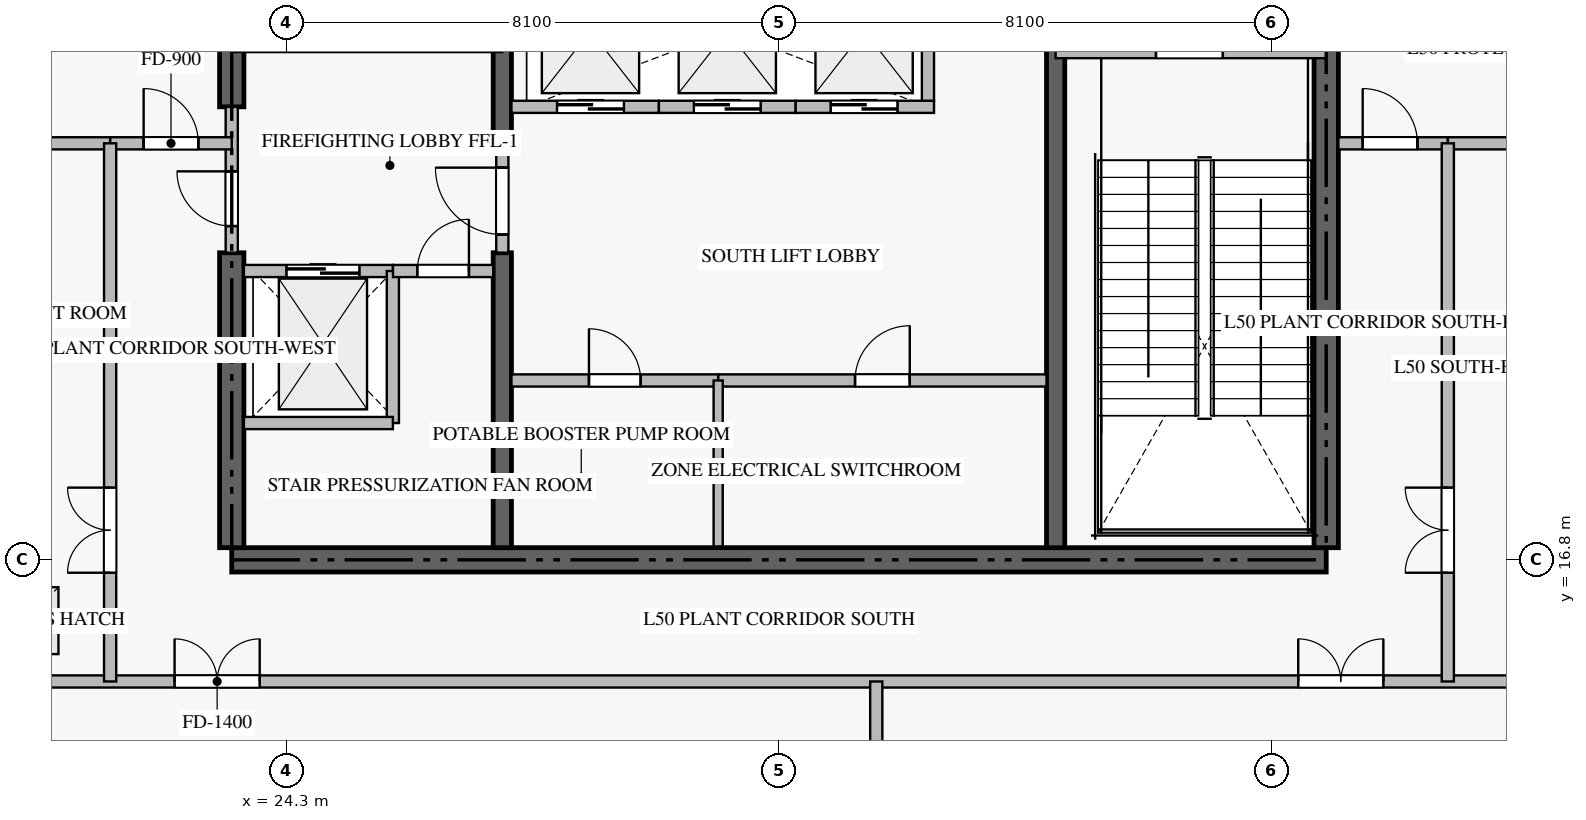
"""IFC4 building model, lengths in metres.
Left out: names, types, materials, properties, quantities, classifications, styles, units other than length and angle.
Written with IfcOpenShell. Run it as: python <this file> out.ifc"""

import sys

from ifc_helpers import new_model, si_unit, direction, frame, frame_2d, origin, origin_2d, place, context, subcontext, project, spatial, rectangle, extrude, source, transform, mapped, element, fill, save


model = new_model("IFC4")
c1 = context("Model", 3, precision=1e-05, world=origin(), true_north=direction((0.0, 1.0)))
c2 = subcontext(c1, "Body", "Model", "MODEL_VIEW")
j1 = project(units=[si_unit("LENGTHUNIT", "METRE"), si_unit("PLANEANGLEUNIT", "RADIAN")], contexts=[c1])
p1 = place(None, origin())
s1 = spatial("IfcSite", under=j1, at=p1, CompositionType="ELEMENT")
p2 = place(p1, origin())
s2 = spatial("IfcBuilding", under=s1, at=p2, CompositionType="ELEMENT")
p3 = place(p2, frame((0.0, 0.0, 198.9)))
s3 = spatial("IfcBuildingStorey", under=s2, at=p3, CompositionType="ELEMENT", Elevation=198.9)
p4 = place(p3, frame((23.4, 16.8, -0.44), z_axis=(0.0, 0.0, 1.0), x_axis=(1.0, 0.0, 0.0)))
e1 = element("IfcWall", 1, at=p4, inside=s3, PredefinedType="SHEAR", context=c2, shape_type="SweptSolid", body=[
    extrude(rectangle(XDim=18.0, YDim=0.4, at=frame_2d((9.0, 0.0))), origin(), (0.0, 0.0, 1.0), 6.078),
])
p5 = place(p3, frame((23.4, 17.0, -0.44), z_axis=(0.0, 0.0, 1.0), x_axis=(0.0, 1.0, 0.0)))
e2 = element("IfcWall", 2, at=p5, inside=s3, PredefinedType="SHEAR", context=c2, shape_type="SweptSolid", body=[
    extrude(rectangle(XDim=4.85, YDim=0.4, at=frame_2d((2.425, 0.0))), origin(), (0.0, 0.0, 1.0), 6.078),
])
p6 = place(p3, frame((23.4, 24.25, -0.44), z_axis=(0.0, 0.0, 1.0), x_axis=(0.0, 1.0, 0.0)))
e3 = element("IfcWall", 3, at=p6, inside=s3, PredefinedType="SHEAR", context=c2, shape_type="SweptSolid", body=[
    extrude(rectangle(XDim=9.15, YDim=0.4, at=frame_2d((4.575, 0.0))), origin(), (0.0, 0.0, 1.0), 6.078),
])
p7 = place(p3, frame((41.4, 17.0, -0.44), z_axis=(0.0, 0.0, 1.0), x_axis=(0.0, 1.0, 0.0)))
e4 = element("IfcWall", 4, at=p7, inside=s3, PredefinedType="SHEAR", context=c2, shape_type="SweptSolid", body=[
    extrude(rectangle(XDim=8.35, YDim=0.4, at=frame_2d((4.175, 0.0))), origin(), (0.0, 0.0, 1.0), 6.078),
])
p8 = place(p3, frame((27.85, 17.0, -0.44), z_axis=(0.0, 0.0, 1.0), x_axis=(0.0, 1.0, 0.0)))
e5 = element("IfcWall", 5, at=p8, inside=s3, PredefinedType="SHEAR", context=c2, shape_type="SweptSolid", body=[
    extrude(rectangle(XDim=4.85, YDim=0.3, at=frame_2d((2.425, 0.0))), origin(), (0.0, 0.0, 1.0), 6.078),
])
p9 = place(p3, frame((27.85, 23.55, -0.44), z_axis=(0.0, 0.0, 1.0), x_axis=(0.0, 1.0, 0.0)))
e6 = element("IfcWall", 6, at=p9, inside=s3, PredefinedType="SHEAR", context=c2, shape_type="SweptSolid", body=[
    extrude(rectangle(XDim=9.85, YDim=0.3, at=frame_2d((4.925, 0.0))), origin(), (0.0, 0.0, 1.0), 6.078),
])
p10 = place(p3, frame((36.95, 17.0, -0.44), z_axis=(0.0, 0.0, 1.0), x_axis=(0.0, 1.0, 0.0)))
e7 = element("IfcWall", 7, at=p10, inside=s3, PredefinedType="SHEAR", context=c2, shape_type="SweptSolid", body=[
    extrude(rectangle(XDim=8.35, YDim=0.3, at=frame_2d((4.175, 0.0))), origin(), (0.0, 0.0, 1.0), 6.078),
])
p11 = place(p3, frame((36.95, 25.15, 0.0), z_axis=(0.0, 0.0, 1.0), x_axis=(1.0, 0.0, 0.0)))
e8 = element("IfcWall", 8, at=p11, inside=s3, PredefinedType="STANDARD", context=c2, shape_type="SweptSolid", body=[
    extrude(rectangle(XDim=4.45, YDim=0.2, at=frame_2d((2.225, 0.0))), origin(), (0.0, 0.0, 1.0), 5.64),
])
p12 = place(p11, frame((1.65, 0.0, 0.0)))
e9 = element("IfcOpeningElement", 9, at=p12, cuts=e8, PredefinedType="OPENING", context=c2, shape_type="SweptSolid", body=[
    extrude(rectangle(XDim=1.1, YDim=2.15, at=frame_2d((0.55, 1.075))), frame((0.0, 0.11, 0.0), z_axis=(0.0, -1.0, 0.0), x_axis=(1.0, 0.0, 0.0)), (0.0, 0.0, 1.0), 0.22),
])
p13 = place(p3, frame((23.6, 21.55, 0.0), z_axis=(0.0, 0.0, 1.0), x_axis=(1.0, 0.0, 0.0)))
e10 = element("IfcWall", 10, at=p13, inside=s3, PredefinedType="STANDARD", context=c2, shape_type="SweptSolid", body=[
    extrude(rectangle(XDim=2.45, YDim=0.2, at=frame_2d((1.225, 0.0))), origin(), (0.0, 0.0, 1.0), 5.64),
])
p14 = place(p13, frame((0.7, 0.0, 0.0)))
e11 = element("IfcOpeningElement", 11, at=p14, cuts=e10, PredefinedType="OPENING", context=c2, shape_type="SweptSolid", body=[
    extrude(rectangle(XDim=1.2, YDim=2.2, at=frame_2d((0.6, 1.1))), frame((0.0, 0.11, 0.0), z_axis=(0.0, -1.0, 0.0), x_axis=(1.0, 0.0, 0.0)), (0.0, 0.0, 1.0), 0.22),
])
p15 = place(p3, frame((28.0, 24.25, 0.0), z_axis=(0.0, 0.0, 1.0), x_axis=(1.0, 0.0, 0.0)))
e12 = element("IfcWall", 12, at=p15, inside=s3, PredefinedType="STANDARD", context=c2, shape_type="SweptSolid", body=[
    extrude(rectangle(XDim=2.425, YDim=0.2, at=frame_2d((1.212, 0.0))), origin(), (0.0, 0.0, 1.0), 5.64),
])
p16 = place(p15, frame((0.75, 0.0, 0.0)))
e13 = element("IfcOpeningElement", 13, at=p16, cuts=e12, PredefinedType="OPENING", context=c2, shape_type="SweptSolid", body=[
    extrude(rectangle(XDim=1.1, YDim=2.2, at=frame_2d((0.55, 1.1))), frame((0.0, 0.11, 0.0), z_axis=(0.0, -1.0, 0.0), x_axis=(1.0, 0.0, 0.0)), (0.0, 0.0, 1.0), 0.22),
])
p17 = place(p3, frame((30.425, 24.25, 0.0), z_axis=(0.0, 0.0, 1.0), x_axis=(1.0, 0.0, 0.0)))
e14 = element("IfcWall", 14, at=p17, inside=s3, PredefinedType="STANDARD", context=c2, shape_type="SweptSolid", body=[
    extrude(rectangle(XDim=2.25, YDim=0.2, at=frame_2d((1.125, 0.0))), origin(), (0.0, 0.0, 1.0), 5.64),
])
p18 = place(p17, frame((0.575, 0.0, 0.0)))
e15 = element("IfcOpeningElement", 15, at=p18, cuts=e14, PredefinedType="OPENING", context=c2, shape_type="SweptSolid", body=[
    extrude(rectangle(XDim=1.1, YDim=2.2, at=frame_2d((0.55, 1.1))), frame((0.0, 0.11, 0.0), z_axis=(0.0, -1.0, 0.0), x_axis=(1.0, 0.0, 0.0)), (0.0, 0.0, 1.0), 0.22),
])
p19 = place(p3, frame((32.675, 24.25, 0.0), z_axis=(0.0, 0.0, 1.0), x_axis=(1.0, 0.0, 0.0)))
e16 = element("IfcWall", 16, at=p19, inside=s3, PredefinedType="STANDARD", context=c2, shape_type="SweptSolid", body=[
    extrude(rectangle(XDim=2.275, YDim=0.2, at=frame_2d((1.137, 0.0))), origin(), (0.0, 0.0, 1.0), 5.64),
])
p20 = place(p19, frame((0.575, 0.0, 0.0)))
e17 = element("IfcOpeningElement", 17, at=p20, cuts=e16, PredefinedType="OPENING", context=c2, shape_type="SweptSolid", body=[
    extrude(rectangle(XDim=1.1, YDim=2.2, at=frame_2d((0.55, 1.1))), frame((0.0, 0.11, 0.0), z_axis=(0.0, -1.0, 0.0), x_axis=(1.0, 0.0, 0.0)), (0.0, 0.0, 1.0), 0.22),
])
for number, where, z_axis, x_axis in (
    (18, (34.85, 24.35, 0.0), (0.0, 0.0, 1.0), (0.0, 1.0, 0.0)),
    (19, (26.05, 19.05, 0.0), (0.0, 0.0, 1.0), (0.0, 1.0, 0.0)),
):
    element("IfcWall", number, at=place(p3, frame(where, z_axis=z_axis, x_axis=x_axis)), inside=s3, PredefinedType="STANDARD", context=c2, shape_type="SweptSolid", body=[
        extrude(rectangle(XDim=2.5, YDim=0.2, at=frame_2d((1.25, 0.0))), origin(), (0.0, 0.0, 1.0), 5.64),
    ])
p21 = place(p3, frame((23.6, 19.05, 0.0), z_axis=(0.0, 0.0, 1.0), x_axis=(1.0, 0.0, 0.0)))
e20 = element("IfcWall", 20, at=p21, inside=s3, PredefinedType="STANDARD", context=c2, shape_type="SweptSolid", body=[
    extrude(rectangle(XDim=2.45, YDim=0.2, at=frame_2d((1.225, 0.0))), origin(), (0.0, 0.0, 1.0), 5.64),
])
p22 = place(p3, frame((26.052, 21.55, 0.0), z_axis=(0.0, 0.0, 1.0), x_axis=(1.0, 0.0, 0.0)))
e21 = element("IfcWall", 21, at=p22, inside=s3, PredefinedType="STANDARD", context=c2, shape_type="SweptSolid", body=[
    extrude(rectangle(XDim=1.648, YDim=0.2, at=frame_2d((0.824, 0.0))), origin(), (0.0, 0.0, 1.0), 5.64),
])
p23 = place(p22, frame((0.399, 0.0, 0.0)))
e22 = element("IfcOpeningElement", 22, at=p23, cuts=e21, PredefinedType="OPENING", context=c2, shape_type="SweptSolid", body=[
    extrude(rectangle(XDim=0.85, YDim=2.1, at=frame_2d((0.425, 1.05))), frame((0.0, 0.11, 0.0), z_axis=(0.0, -1.0, 0.0), x_axis=(1.0, 0.0, 0.0)), (0.0, 0.0, 1.0), 0.22),
])
p24 = place(p3, frame((23.4, 21.852, 0.0), z_axis=(0.0, 0.0, 1.0), x_axis=(0.0, 1.0, 0.0)))
e23 = element("IfcWall", 23, at=p24, inside=s3, PredefinedType="STANDARD", context=c2, shape_type="SweptSolid", body=[
    extrude(rectangle(XDim=2.396, YDim=0.2, at=frame_2d((1.198, 0.0))), origin(), (0.0, 0.0, 1.0), 5.64),
])
p25 = place(p24, frame((0.437, 0.0, 0.0)))
e24 = element("IfcOpeningElement", 24, at=p25, cuts=e23, PredefinedType="OPENING", context=c2, shape_type="SweptSolid", body=[
    extrude(rectangle(XDim=0.9, YDim=2.1, at=frame_2d((0.45, 1.05))), frame((0.0, 0.11, 0.0), z_axis=(0.0, -1.0, 0.0), x_axis=(1.0, 0.0, 0.0)), (0.0, 0.0, 1.0), 0.22),
])
p26 = place(p3, frame((27.85, 21.852, 0.0), z_axis=(0.0, 0.0, 1.0), x_axis=(0.0, 1.0, 0.0)))
e25 = element("IfcWall", 25, at=p26, inside=s3, PredefinedType="STANDARD", context=c2, shape_type="SweptSolid", body=[
    extrude(rectangle(XDim=1.696, YDim=0.2, at=frame_2d((0.848, 0.0))), origin(), (0.0, 0.0, 1.0), 5.64),
])
p27 = place(p26, frame((0.298, 0.0, 0.0)))
e26 = element("IfcOpeningElement", 26, at=p27, cuts=e25, PredefinedType="OPENING", context=c2, shape_type="SweptSolid", body=[
    extrude(rectangle(XDim=1.1, YDim=2.15, at=frame_2d((0.55, 1.075))), frame((0.0, 0.11, 0.0), z_axis=(0.0, -1.0, 0.0), x_axis=(1.0, 0.0, 0.0)), (0.0, 0.0, 1.0), 0.22),
])
p28 = place(p3, frame((28.0, 19.75, 0.0), z_axis=(0.0, 0.0, 1.0), x_axis=(1.0, 0.0, 0.0)))
e27 = element("IfcWall", 27, at=p28, inside=s3, PredefinedType="STANDARD", context=c2, shape_type="SweptSolid", body=[
    extrude(rectangle(XDim=3.4, YDim=0.2, at=frame_2d((1.7, 0.0))), origin(), (0.0, 0.0, 1.0), 5.64),
])
p29 = place(p28, frame((1.275, 0.0, 0.0)))
e28 = element("IfcOpeningElement", 28, at=p29, cuts=e27, PredefinedType="OPENING", context=c2, shape_type="SweptSolid", body=[
    extrude(rectangle(XDim=0.85, YDim=2.1, at=frame_2d((0.425, 1.05))), frame((0.0, 0.11, 0.0), z_axis=(0.0, -1.0, 0.0), x_axis=(1.0, 0.0, 0.0)), (0.0, 0.0, 1.0), 0.22),
])
p30 = place(p3, frame((31.402, 19.75, 0.0), z_axis=(0.0, 0.0, 1.0), x_axis=(1.0, 0.0, 0.0)))
e29 = element("IfcWall", 29, at=p30, inside=s3, PredefinedType="STANDARD", context=c2, shape_type="SweptSolid", body=[
    extrude(rectangle(XDim=5.398, YDim=0.2, at=frame_2d((2.699, 0.0))), origin(), (0.0, 0.0, 1.0), 5.64),
])
p31 = place(p30, frame((2.249, 0.0, 0.0)))
e30 = element("IfcOpeningElement", 30, at=p31, cuts=e29, PredefinedType="OPENING", context=c2, shape_type="SweptSolid", body=[
    extrude(rectangle(XDim=0.9, YDim=2.1, at=frame_2d((0.45, 1.05))), frame((0.0, 0.11, 0.0), z_axis=(0.0, -1.0, 0.0), x_axis=(1.0, 0.0, 0.0)), (0.0, 0.0, 1.0), 0.22),
])
p32 = place(p3, frame((31.4, 17.02, 0.0), z_axis=(0.0, 0.0, 1.0), x_axis=(0.0, 1.0, 0.0)))
e31 = element("IfcWall", 31, at=p32, inside=s3, PredefinedType="PARTITIONING", context=c2, shape_type="SweptSolid", body=[
    extrude(rectangle(XDim=2.73, YDim=0.15, at=frame_2d((1.365, 0.0))), origin(), (0.0, 0.0, 1.0), 5.64),
])
p33 = place(p3, frame((15.2, 23.65, 0.0), z_axis=(0.0, 0.0, 1.0), x_axis=(1.0, 0.0, 0.0)))
e32 = element("IfcWall", 32, at=p33, inside=s3, PredefinedType="STANDARD", context=c2, shape_type="SweptSolid", body=[
    extrude(rectangle(XDim=6.2, YDim=0.2, at=frame_2d((3.1, 0.0))), origin(), (0.0, 0.0, 1.0), 5.64),
])
p34 = place(p3, frame((21.402, 23.65, 0.0), z_axis=(0.0, 0.0, 1.0), x_axis=(1.0, 0.0, 0.0)))
e33 = element("IfcWall", 33, at=p34, inside=s3, PredefinedType="STANDARD", context=c2, shape_type="SweptSolid", body=[
    extrude(rectangle(XDim=1.998, YDim=0.2, at=frame_2d((0.999, 0.0))), origin(), (0.0, 0.0, 1.0), 5.64),
])
p35 = place(p34, frame((0.549, 0.0, 0.0)))
e34 = element("IfcOpeningElement", 34, at=p35, cuts=e33, PredefinedType="OPENING", context=c2, shape_type="SweptSolid", body=[
    extrude(rectangle(XDim=0.9, YDim=2.1, at=frame_2d((0.45, 1.05))), frame((0.0, 0.11, 0.0), z_axis=(0.0, -1.0, 0.0), x_axis=(1.0, 0.0, 0.0)), (0.0, 0.0, 1.0), 0.22),
])
p36 = place(p3, frame((41.6, 23.65, 0.0), z_axis=(0.0, 0.0, 1.0), x_axis=(1.0, 0.0, 0.0)))
e35 = element("IfcWall", 35, at=p36, inside=s3, PredefinedType="STANDARD", context=c2, shape_type="SweptSolid", body=[
    extrude(rectangle(XDim=1.8, YDim=0.2, at=frame_2d((0.9, 0.0))), origin(), (0.0, 0.0, 1.0), 5.64),
])
p37 = place(p36, frame((0.4, 0.0, 0.0)))
e36 = element("IfcOpeningElement", 36, at=p37, cuts=e35, PredefinedType="OPENING", context=c2, shape_type="SweptSolid", body=[
    extrude(rectangle(XDim=0.9, YDim=2.1, at=frame_2d((0.45, 1.05))), frame((0.0, 0.11, 0.0), z_axis=(0.0, -1.0, 0.0), x_axis=(1.0, 0.0, 0.0)), (0.0, 0.0, 1.0), 0.22),
])
p38 = place(p3, frame((43.402, 23.65, 0.0), z_axis=(0.0, 0.0, 1.0), x_axis=(1.0, 0.0, 0.0)))
e37 = element("IfcWall", 37, at=p38, inside=s3, PredefinedType="STANDARD", context=c2, shape_type="SweptSolid", body=[
    extrude(rectangle(XDim=6.198, YDim=0.2, at=frame_2d((3.099, 0.0))), origin(), (0.0, 0.0, 1.0), 5.64),
])
p39 = place(p3, frame((15.2, 14.8, 0.0), z_axis=(0.0, 0.0, 1.0), x_axis=(1.0, 0.0, 0.0)))
e38 = element("IfcWall", 38, at=p39, inside=s3, PredefinedType="STANDARD", context=c2, shape_type="SweptSolid", body=[
    extrude(rectangle(XDim=34.4, YDim=0.2, at=frame_2d((17.2, 0.0))), origin(), (0.0, 0.0, 1.0), 5.64),
])
p40 = place(p39, frame((7.26, 0.0, 0.0)))
e39 = element("IfcOpeningElement", 39, at=p40, cuts=e38, PredefinedType="OPENING", context=c2, shape_type="SweptSolid", body=[
    extrude(rectangle(XDim=1.4, YDim=2.2, at=frame_2d((0.7, 1.1))), frame((0.0, 0.11, 0.0), z_axis=(0.0, -1.0, 0.0), x_axis=(1.0, 0.0, 0.0)), (0.0, 0.0, 1.0), 0.22),
])
p41 = place(p39, frame((25.74, 0.0, 0.0)))
e40 = element("IfcOpeningElement", 40, at=p41, cuts=e38, PredefinedType="OPENING", context=c2, shape_type="SweptSolid", body=[
    extrude(rectangle(XDim=1.4, YDim=2.2, at=frame_2d((0.7, 1.1))), frame((0.0, 0.11, 0.0), z_axis=(0.0, -1.0, 0.0), x_axis=(1.0, 0.0, 0.0)), (0.0, 0.0, 1.0), 0.22),
])
p42 = place(p3, frame((34.0, 9.0, 0.0), z_axis=(0.0, 0.0, 1.0), x_axis=(0.0, 1.0, 0.0)))
e41 = element("IfcWall", 41, at=p42, inside=s3, PredefinedType="STANDARD", context=c2, shape_type="SweptSolid", body=[
    extrude(rectangle(XDim=5.8, YDim=0.2, at=frame_2d((2.9, 0.0))), origin(), (0.0, 0.0, 1.0), 5.64),
])
p43 = place(p3, frame((21.4, 14.8, 0.0), z_axis=(0.0, 0.0, 1.0), x_axis=(0.0, 1.0, 0.0)))
e42 = element("IfcWall", 42, at=p43, inside=s3, PredefinedType="STANDARD", context=c2, shape_type="SweptSolid", body=[
    extrude(rectangle(XDim=8.85, YDim=0.2, at=frame_2d((4.425, 0.0))), origin(), (0.0, 0.0, 1.0), 5.64),
])
p44 = place(p43, frame((1.788, 0.0, 0.0)))
e43 = element("IfcOpeningElement", 43, at=p44, cuts=e42, PredefinedType="OPENING", context=c2, shape_type="SweptSolid", body=[
    extrude(rectangle(XDim=1.4, YDim=2.2, at=frame_2d((0.7, 1.1))), frame((0.0, 0.11, 0.0), z_axis=(0.0, -1.0, 0.0), x_axis=(1.0, 0.0, 0.0)), (0.0, 0.0, 1.0), 0.22),
])
p45 = place(p3, frame((43.4, 14.8, 0.0), z_axis=(0.0, 0.0, 1.0), x_axis=(0.0, 1.0, 0.0)))
e44 = element("IfcWall", 44, at=p45, inside=s3, PredefinedType="STANDARD", context=c2, shape_type="SweptSolid", body=[
    extrude(rectangle(XDim=8.85, YDim=0.2, at=frame_2d((4.425, 0.0))), origin(), (0.0, 0.0, 1.0), 5.64),
])
p46 = place(p45, frame((1.788, 0.0, 0.0)))
e45 = element("IfcOpeningElement", 45, at=p46, cuts=e44, PredefinedType="OPENING", context=c2, shape_type="SweptSolid", body=[
    extrude(rectangle(XDim=1.4, YDim=2.2, at=frame_2d((0.7, 1.1))), frame((0.0, 0.11, 0.0), z_axis=(0.0, -1.0, 0.0), x_axis=(1.0, 0.0, 0.0)), (0.0, 0.0, 1.0), 0.22),
])
p47 = place(p2, frame((0.0, 0.0, 204.9)))
p48 = place(p47, frame((0.0, 0.0, -0.36)))
p49 = place(p48, frame((20.0, 15.8, 0.0)))
p50 = place(p49, frame((0.0, 0.0, 0.32)))
e46 = element("IfcDoor", 46, at=p50, inside=s3, OperationType="SINGLE_SWING_LEFT", PredefinedType="TRAPDOOR", context=c2, shape_type="SweptSolid", body=[
    extrude(rectangle(XDim=1.1, YDim=1.1, at=origin_2d()), origin(), (0.0, 0.0, 1.0), 0.04),
])
m1 = source(origin(), c2, "Body", "SweptSolid", [
    extrude(rectangle(XDim=1.1, YDim=2.15, at=frame_2d((0.55, 1.075))), frame((0.0, 0.025, 0.0), z_axis=(0.0, -1.0, 0.0), x_axis=(1.0, 0.0, 0.0)), (0.0, 0.0, 1.0), 0.05),
])
p51 = place(p12, origin())
e47 = element("IfcDoor", 47, at=p51, inside=s3, OperationType="SINGLE_SWING_LEFT", PredefinedType="DOOR", context=c2, shape_type="MappedRepresentation", body=[
    mapped(m1, transform((0.0, 0.0, 0.0), scale=1.0)),
])
fill(e9, e47)
m2 = source(origin(), c2, "Body", "SweptSolid", [
    extrude(rectangle(XDim=1.2, YDim=2.2, at=frame_2d((0.6, 1.1))), frame((0.0, 0.025, 0.0), z_axis=(0.0, -1.0, 0.0), x_axis=(1.0, 0.0, 0.0)), (0.0, 0.0, 1.0), 0.05),
])
p52 = place(p14, origin())
e48 = element("IfcDoor", 48, at=p52, inside=s3, OperationType="DOUBLE_DOOR_SLIDING", PredefinedType="DOOR", context=c2, shape_type="MappedRepresentation", body=[
    mapped(m2, transform((0.0, 0.0, 0.0), scale=1.0)),
])
fill(e11, e48)
m3 = source(origin(), c2, "Body", "SweptSolid", [
    extrude(rectangle(XDim=1.1, YDim=2.2, at=frame_2d((0.55, 1.1))), frame((0.0, 0.025, 0.0), z_axis=(0.0, -1.0, 0.0), x_axis=(1.0, 0.0, 0.0)), (0.0, 0.0, 1.0), 0.05),
])
p53 = place(p16, origin())
e49 = element("IfcDoor", 49, at=p53, inside=s3, OperationType="DOUBLE_DOOR_SLIDING", PredefinedType="DOOR", context=c2, shape_type="MappedRepresentation", body=[
    mapped(m3, transform((0.0, 0.0, 0.0), scale=1.0)),
])
fill(e13, e49)
p54 = place(p18, origin())
e50 = element("IfcDoor", 50, at=p54, inside=s3, OperationType="DOUBLE_DOOR_SLIDING", PredefinedType="DOOR", context=c2, shape_type="MappedRepresentation", body=[
    mapped(m3, transform((0.0, 0.0, 0.0), scale=1.0)),
])
fill(e15, e50)
p55 = place(p20, origin())
e51 = element("IfcDoor", 51, at=p55, inside=s3, OperationType="DOUBLE_DOOR_SLIDING", PredefinedType="DOOR", context=c2, shape_type="MappedRepresentation", body=[
    mapped(m3, transform((0.0, 0.0, 0.0), scale=1.0)),
])
fill(e17, e51)
m4 = source(origin(), c2, "Body", "SweptSolid", [
    extrude(rectangle(XDim=0.85, YDim=2.1, at=frame_2d((0.425, 1.05))), frame((0.0, 0.025, 0.0), z_axis=(0.0, -1.0, 0.0), x_axis=(1.0, 0.0, 0.0)), (0.0, 0.0, 1.0), 0.05),
])
p56 = place(p23, origin())
e52 = element("IfcDoor", 52, at=p56, inside=s3, OperationType="SINGLE_SWING_RIGHT", PredefinedType="DOOR", context=c2, shape_type="MappedRepresentation", body=[
    mapped(m4, transform((0.0, 0.0, 0.0), scale=1.0)),
])
fill(e22, e52)
m5 = source(origin(), c2, "Body", "SweptSolid", [
    extrude(rectangle(XDim=0.9, YDim=2.1, at=frame_2d((0.45, 1.05))), frame((0.0, 0.025, 0.0), z_axis=(0.0, -1.0, 0.0), x_axis=(1.0, 0.0, 0.0)), (0.0, 0.0, 1.0), 0.05),
])
p57 = place(p25, origin())
e53 = element("IfcDoor", 53, at=p57, inside=s3, OperationType="SINGLE_SWING_RIGHT", PredefinedType="DOOR", context=c2, shape_type="MappedRepresentation", body=[
    mapped(m5, transform((0.0, 0.0, 0.0), scale=1.0)),
])
fill(e24, e53)
p58 = place(p27, origin())
e54 = element("IfcDoor", 54, at=p58, inside=s3, OperationType="SINGLE_SWING_RIGHT", PredefinedType="DOOR", context=c2, shape_type="MappedRepresentation", body=[
    mapped(m1, transform((0.0, 0.0, 0.0), scale=1.0)),
])
fill(e26, e54)
p59 = place(p29, origin())
e55 = element("IfcDoor", 55, at=p59, inside=s3, OperationType="SINGLE_SWING_LEFT", PredefinedType="DOOR", context=c2, shape_type="MappedRepresentation", body=[
    mapped(m4, transform((0.0, 0.0, 0.0), scale=1.0)),
])
fill(e28, e55)
p60 = place(p31, origin())
e56 = element("IfcDoor", 56, at=p60, inside=s3, OperationType="SINGLE_SWING_RIGHT", PredefinedType="DOOR", context=c2, shape_type="MappedRepresentation", body=[
    mapped(m5, transform((0.0, 0.0, 0.0), scale=1.0)),
])
fill(e30, e56)
p61 = place(p35, origin())
e57 = element("IfcDoor", 57, at=p61, inside=s3, OperationType="SINGLE_SWING_LEFT", PredefinedType="DOOR", context=c2, shape_type="MappedRepresentation", body=[
    mapped(m5, transform((0.0, 0.0, 0.0), scale=1.0)),
])
fill(e34, e57)
p62 = place(p37, origin())
e58 = element("IfcDoor", 58, at=p62, inside=s3, OperationType="SINGLE_SWING_LEFT", PredefinedType="DOOR", context=c2, shape_type="MappedRepresentation", body=[
    mapped(m5, transform((0.0, 0.0, 0.0), scale=1.0)),
])
fill(e36, e58)
m6 = source(origin(), c2, "Body", "SweptSolid", [
    extrude(rectangle(XDim=1.4, YDim=2.2, at=frame_2d((0.7, 1.1))), frame((0.0, 0.025, 0.0), z_axis=(0.0, -1.0, 0.0), x_axis=(1.0, 0.0, 0.0)), (0.0, 0.0, 1.0), 0.05),
])
p63 = place(p40, origin())
e59 = element("IfcDoor", 59, at=p63, inside=s3, OperationType="DOUBLE_DOOR_SINGLE_SWING", PredefinedType="DOOR", context=c2, shape_type="MappedRepresentation", body=[
    mapped(m6, transform((0.0, 0.0, 0.0), scale=1.0)),
])
fill(e39, e59)
p64 = place(p41, origin())
e60 = element("IfcDoor", 60, at=p64, inside=s3, OperationType="DOUBLE_DOOR_SINGLE_SWING", PredefinedType="DOOR", context=c2, shape_type="MappedRepresentation", body=[
    mapped(m6, transform((0.0, 0.0, 0.0), scale=1.0)),
])
fill(e40, e60)
p65 = place(p44, origin())
e61 = element("IfcDoor", 61, at=p65, inside=s3, OperationType="DOUBLE_DOOR_SINGLE_SWING", PredefinedType="DOOR", context=c2, shape_type="MappedRepresentation", body=[
    mapped(m6, transform((0.0, 0.0, 0.0), scale=1.0)),
])
fill(e43, e61)
p66 = place(p46, origin())
e62 = element("IfcDoor", 62, at=p66, inside=s3, OperationType="DOUBLE_DOOR_SINGLE_SWING", PredefinedType="DOOR", context=c2, shape_type="MappedRepresentation", body=[
    mapped(m6, transform((0.0, 0.0, 0.0), scale=1.0)),
])
fill(e45, e62)
save(model, sys.argv[1])
